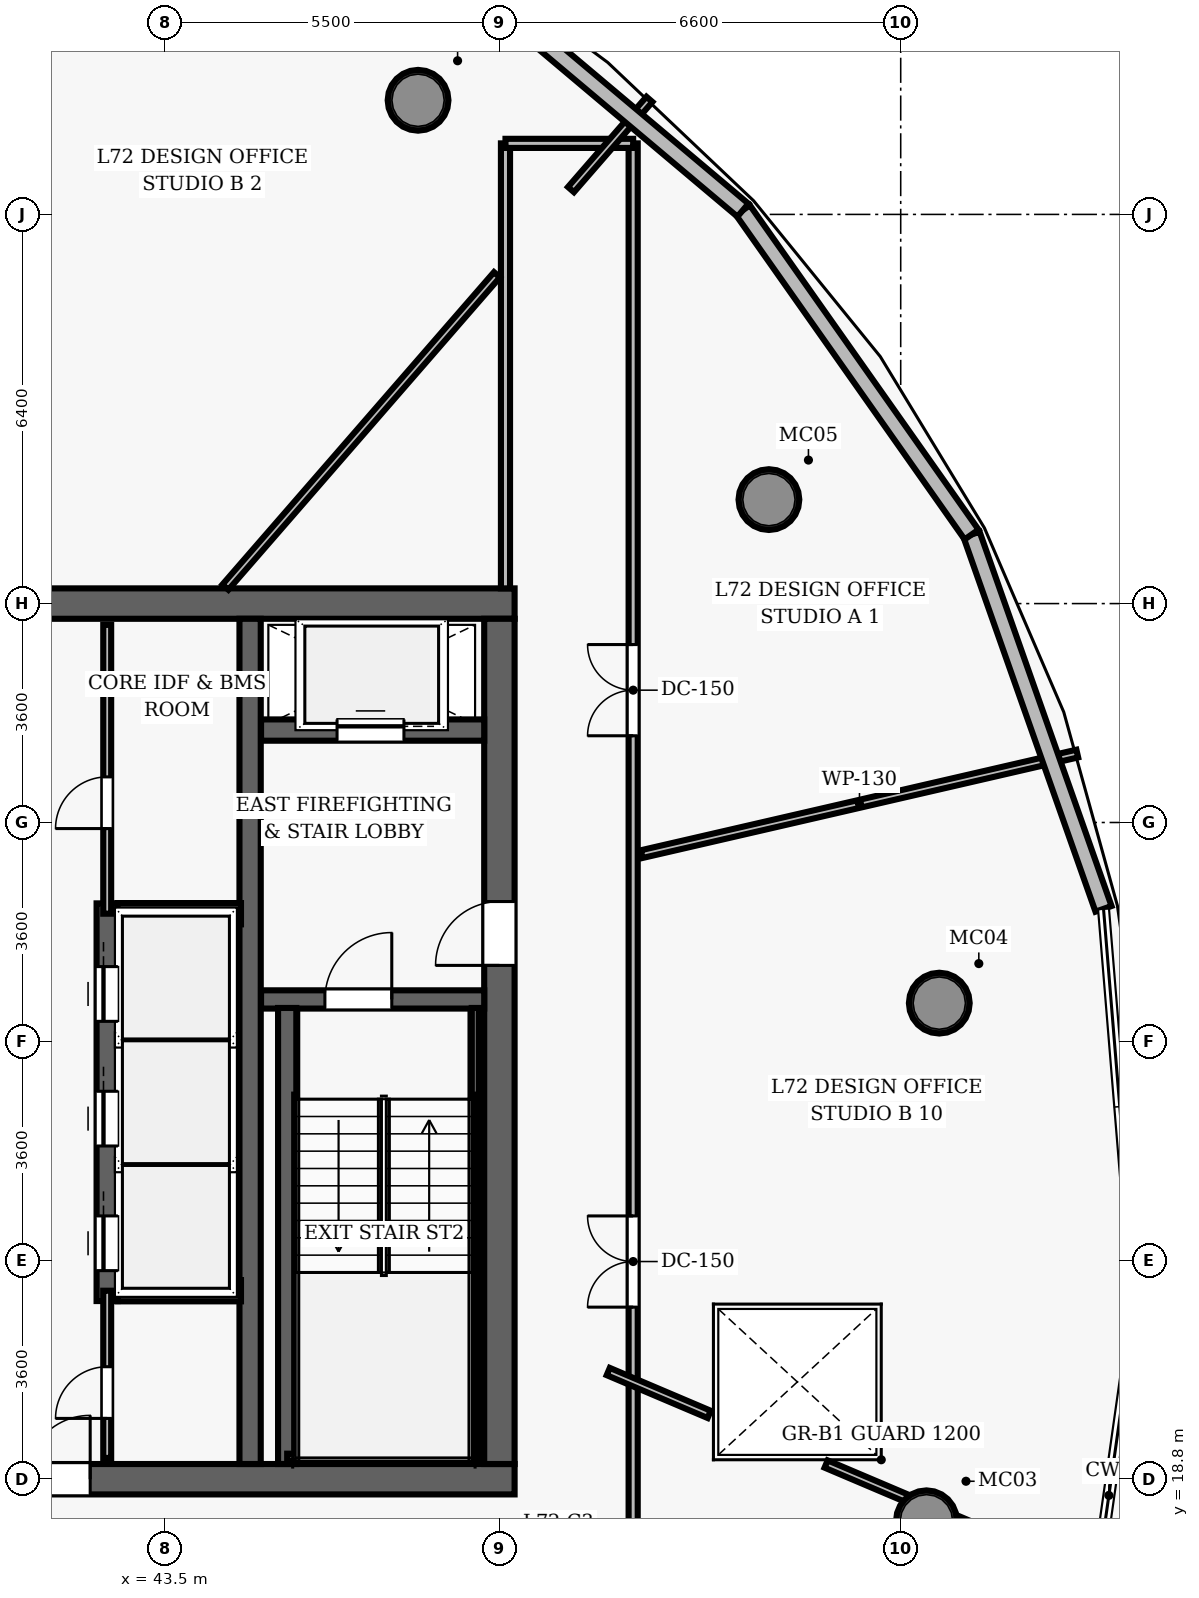
"""IFC4 building model, lengths in metres.
Left out: names, types, materials, properties, quantities, classifications, styles, units other than length and angle.
Written with IfcOpenShell. Run it as: python <this file> out.ifc"""

import sys

from ifc_helpers import new_model, si_unit, direction, frame, frame_2d, origin, origin_2d, place, context, subcontext, project, spatial, rectangle, hollow_circle, extrude, element, fill, save


model = new_model("IFC4")
c1 = context("Model", 3, precision=1e-05, world=origin(), true_north=direction((0.0, 1.0)))
c2 = subcontext(c1, "Body", "Model", "MODEL_VIEW")
j1 = project(units=[si_unit("LENGTHUNIT", "METRE"), si_unit("PLANEANGLEUNIT", "RADIAN")], contexts=[c1])
p1 = place(None, origin())
s1 = spatial("IfcSite", under=j1, at=p1, CompositionType="ELEMENT")
p2 = place(p1, origin())
s2 = spatial("IfcBuilding", under=s1, at=p2, CompositionType="ELEMENT")
p3 = place(p2, frame((0.0, 0.0, 284.4)))
s3 = spatial("IfcBuildingStorey", under=s2, at=p3, CompositionType="ELEMENT", Elevation=284.4)
p4 = place(p3, frame((26.75, 18.8, 0.0), z_axis=(0.0, 0.0, 1.0), x_axis=(1.0, 0.0, 0.0)))
e1 = element("IfcWall", 1, at=p4, inside=s3, PredefinedType="SHEAR", context=c2, shape_type="SweptSolid", body=[
    extrude(rectangle(XDim=22.5, YDim=0.5, at=frame_2d((11.25, 0.0))), origin(), (0.0, 0.0, 1.0), 3.85),
])
p5 = place(p4, frame((14.47, 0.0, 0.0)))
e2 = element("IfcOpeningElement", 2, at=p5, cuts=e1, PredefinedType="OPENING", context=c2, shape_type="SweptSolid", body=[
    extrude(rectangle(XDim=1.05, YDim=2.15, at=frame_2d((0.525, 1.075))), frame((0.0, 0.26, 0.0), z_axis=(0.0, -1.0, 0.0), x_axis=(1.0, 0.0, 0.0)), (0.0, 0.0, 1.0), 0.52),
])
p6 = place(p3, frame((26.75, 33.2, 0.0), z_axis=(0.0, 0.0, 1.0), x_axis=(1.0, 0.0, 0.0)))
e3 = element("IfcWall", 3, at=p6, inside=s3, PredefinedType="SHEAR", context=c2, shape_type="SweptSolid", body=[
    extrude(rectangle(XDim=22.5, YDim=0.5, at=frame_2d((11.25, 0.0))), origin(), (0.0, 0.0, 1.0), 3.85),
])
p7 = place(p3, frame((49.0, 19.05, 0.0), z_axis=(0.0, 0.0, 1.0), x_axis=(0.0, 1.0, 0.0)))
e4 = element("IfcWall", 4, at=p7, inside=s3, PredefinedType="SHEAR", context=c2, shape_type="SweptSolid", body=[
    extrude(rectangle(XDim=13.9, YDim=0.5, at=frame_2d((6.95, 0.0))), origin(), (0.0, 0.0, 1.0), 3.85),
])
p8 = place(p7, frame((8.2, 0.0, 0.0)))
e5 = element("IfcOpeningElement", 5, at=p8, cuts=e4, PredefinedType="OPENING", context=c2, shape_type="SweptSolid", body=[
    extrude(rectangle(XDim=1.05, YDim=2.15, at=frame_2d((0.525, 1.075))), frame((0.0, 0.26, 0.0), z_axis=(0.0, -1.0, 0.0), x_axis=(1.0, 0.0, 0.0)), (0.0, 0.0, 1.0), 0.52),
])
p9 = place(p3, frame((44.9, 19.05, 0.0), z_axis=(0.0, 0.0, 1.0), x_axis=(0.0, 1.0, 0.0)))
e6 = element("IfcWall", 6, at=p9, inside=s3, PredefinedType="SHEAR", context=c2, shape_type="SweptSolid", body=[
    extrude(rectangle(XDim=13.9, YDim=0.35, at=frame_2d((6.95, 0.0))), origin(), (0.0, 0.0, 1.0), 3.85),
])
for number, where, z_axis, x_axis in (
    (7, (56.024, 18.116, 0.0), (0.0, 0.0, 1.0), (1.0, 0.0, 0.0)),
    (8, (56.235, 26.629, 0.0), (0.0, 0.0, 1.0), (1.0, 0.0, 0.0)),
    (9, (53.433, 34.91, 0.0), (0.0, 0.0, 1.0), (1.0, 0.0, 0.0)),
    (10, (47.662, 41.477, 0.0), (0.0, 0.0, 1.0), (1.0, 0.0, 0.0)),
):
    element("IfcColumn", number, at=place(p3, frame(where, z_axis=z_axis, x_axis=x_axis)), inside=s3, PredefinedType="COLUMN", context=c2, shape_type="SweptSolid", body=[
        extrude(hollow_circle(Radius=0.5, WallThickness=0.045, at=origin_2d()), origin(), (0.0, 0.0, 1.0), 3.85),
    ])
p10 = place(p3, frame((45.08, 26.69, 0.0), z_axis=(0.0, 0.0, 1.0), x_axis=(1.0, 0.0, 0.0)))
e11 = element("IfcWall", 11, at=p10, inside=s3, PredefinedType="SHEAR", context=c2, shape_type="SweptSolid", body=[
    extrude(rectangle(XDim=3.67, YDim=0.3, at=frame_2d((1.835, 0.0))), origin(), (0.0, 0.0, 1.0), 3.85),
])
p11 = place(p10, frame((1.05, 0.0, 0.0)))
e12 = element("IfcOpeningElement", 12, at=p11, cuts=e11, PredefinedType="OPENING", context=c2, shape_type="SweptSolid", body=[
    extrude(rectangle(XDim=1.1, YDim=2.15, at=frame_2d((0.55, 1.075))), frame((0.0, 0.16, 0.0), z_axis=(0.0, -1.0, 0.0), x_axis=(1.0, 0.0, 0.0)), (0.0, 0.0, 1.0), 0.32),
])
p12 = place(p3, frame((45.51, 19.05, 0.0), z_axis=(0.0, 0.0, 1.0), x_axis=(0.0, 1.0, 0.0)))
e13 = element("IfcWall", 13, at=p12, inside=s3, PredefinedType="SHEAR", context=c2, shape_type="SweptSolid", body=[
    extrude(rectangle(XDim=7.5, YDim=0.3, at=frame_2d((3.75, 0.0))), origin(), (0.0, 0.0, 1.0), 3.85),
])
p13 = place(p3, frame((48.605, 19.1, 0.0), z_axis=(0.0, 0.0, 1.0), x_axis=(0.0, 1.0, 0.0)))
e14 = element("IfcWall", 14, at=p13, inside=s3, PredefinedType="SHEAR", context=c2, shape_type="SweptSolid", body=[
    extrude(rectangle(XDim=7.45, YDim=0.12, at=frame_2d((3.725, 0.0))), origin(), (0.0, 0.0, 1.0), 3.85),
])
p14 = place(p3, frame((45.51, 19.16, 0.0), z_axis=(0.0, 0.0, 1.0), x_axis=(1.0, 0.0, 0.0)))
e15 = element("IfcWall", 15, at=p14, inside=s3, PredefinedType="SHEAR", context=c2, shape_type="SweptSolid", body=[
    extrude(rectangle(XDim=3.095, YDim=0.12, at=frame_2d((1.547, 0.0))), origin(), (0.0, 0.0, 1.0), 3.85),
])
p15 = place(p3, frame((45.08, 31.12, 0.0), z_axis=(0.0, 0.0, 1.0), x_axis=(1.0, 0.0, 0.0)))
e16 = element("IfcWall", 16, at=p15, inside=s3, PredefinedType="SHEAR", context=c2, shape_type="SweptSolid", body=[
    extrude(rectangle(XDim=3.67, YDim=0.35, at=frame_2d((1.835, 0.0))), origin(), (0.0, 0.0, 1.0), 3.04),
])
p16 = place(p15, frame((1.25, 0.0, 0.0)))
e17 = element("IfcOpeningElement", 17, at=p16, cuts=e16, PredefinedType="OPENING", context=c2, shape_type="SweptSolid", body=[
    extrude(rectangle(XDim=1.1, YDim=2.15, at=frame_2d((0.55, 1.075))), frame((0.0, 0.185, 0.0), z_axis=(0.0, -1.0, 0.0), x_axis=(1.0, 0.0, 0.0)), (0.0, 0.0, 1.0), 0.37),
])
p17 = place(p3, frame((42.55, 21.73, 0.0), z_axis=(0.0, 0.0, 1.0), x_axis=(0.0, 1.0, 0.0)))
e18 = element("IfcWall", 18, at=p17, inside=s3, PredefinedType="SHEAR", context=c2, shape_type="SweptSolid", body=[
    extrude(rectangle(XDim=6.54, YDim=0.35, at=frame_2d((3.27, 0.0))), origin(), (0.0, 0.0, 1.0), 3.04),
])
p18 = place(p17, frame((0.5, 0.0, 0.0)))
e19 = element("IfcOpeningElement", 19, at=p18, cuts=e18, PredefinedType="OPENING", context=c2, shape_type="SweptSolid", body=[
    extrude(rectangle(XDim=0.9, YDim=2.15, at=frame_2d((0.45, 1.075))), frame((0.0, 0.185, 0.0), z_axis=(0.0, -1.0, 0.0), x_axis=(1.0, 0.0, 0.0)), (0.0, 0.0, 1.0), 0.37),
])
p19 = place(p17, frame((2.55, 0.0, 0.0)))
e20 = element("IfcOpeningElement", 20, at=p19, cuts=e18, PredefinedType="OPENING", context=c2, shape_type="SweptSolid", body=[
    extrude(rectangle(XDim=0.9, YDim=2.15, at=frame_2d((0.45, 1.075))), frame((0.0, 0.185, 0.0), z_axis=(0.0, -1.0, 0.0), x_axis=(1.0, 0.0, 0.0)), (0.0, 0.0, 1.0), 0.37),
])
p20 = place(p17, frame((4.6, 0.0, 0.0)))
e21 = element("IfcOpeningElement", 21, at=p20, cuts=e18, PredefinedType="OPENING", context=c2, shape_type="SweptSolid", body=[
    extrude(rectangle(XDim=0.9, YDim=2.15, at=frame_2d((0.45, 1.075))), frame((0.0, 0.185, 0.0), z_axis=(0.0, -1.0, 0.0), x_axis=(1.0, 0.0, 0.0)), (0.0, 0.0, 1.0), 0.37),
])
for number, where, z_axis, x_axis in (
    (22, (42.72, 21.9, 0.0), (0.0, 0.0, 1.0), (1.0, 0.0, 0.0)),
    (23, (42.72, 28.1, 0.0), (0.0, 0.0, 1.0), (1.0, 0.0, 0.0)),
):
    element("IfcWall", number, at=place(p3, frame(where, z_axis=z_axis, x_axis=x_axis)), inside=s3, PredefinedType="SHEAR", context=c2, shape_type="SweptSolid", body=[
        extrude(rectangle(XDim=2.03, YDim=0.35, at=frame_2d((1.015, 0.0))), origin(), (0.0, 0.0, 1.0), 3.04),
    ])
p21 = place(p3, frame((42.55, 28.1, 0.0), z_axis=(0.0, 0.0, 1.0), x_axis=(0.0, 1.0, 0.0)))
e24 = element("IfcWall", 24, at=p21, inside=s3, PredefinedType="PARTITIONING", context=c2, shape_type="SweptSolid", body=[
    extrude(rectangle(XDim=4.75, YDim=0.13, at=frame_2d((2.375, 0.0))), origin(), (0.0, 0.0, 1.0), 3.04),
])
p22 = place(p21, frame((1.4, 0.0, 0.0)))
e25 = element("IfcOpeningElement", 25, at=p22, cuts=e24, PredefinedType="OPENING", context=c2, shape_type="SweptSolid", body=[
    extrude(rectangle(XDim=0.85, YDim=2.1, at=frame_2d((0.425, 1.05))), frame((0.0, 0.075, 0.0), z_axis=(0.0, -1.0, 0.0), x_axis=(1.0, 0.0, 0.0)), (0.0, 0.0, 1.0), 0.15),
])
p23 = place(p3, frame((42.55, 19.15, 0.0), z_axis=(0.0, 0.0, 1.0), x_axis=(0.0, 1.0, 0.0)))
e26 = element("IfcWall", 26, at=p23, inside=s3, PredefinedType="PARTITIONING", context=c2, shape_type="SweptSolid", body=[
    extrude(rectangle(XDim=2.75, YDim=0.13, at=frame_2d((1.375, 0.0))), origin(), (0.0, 0.0, 1.0), 3.04),
])
p24 = place(p23, frame((0.65, 0.0, 0.0)))
e27 = element("IfcOpeningElement", 27, at=p24, cuts=e26, PredefinedType="OPENING", context=c2, shape_type="SweptSolid", body=[
    extrude(rectangle(XDim=0.85, YDim=2.1, at=frame_2d((0.425, 1.05))), frame((0.0, 0.075, 0.0), z_axis=(0.0, -1.0, 0.0), x_axis=(1.0, 0.0, 0.0)), (0.0, 0.0, 1.0), 0.15),
])
p25 = place(p3, frame((51.2, 10.6, 0.0), z_axis=(0.0, 0.0, 1.0), x_axis=(0.0, 1.0, 0.0)))
e28 = element("IfcWall", 28, at=p25, inside=s3, PredefinedType="PARTITIONING", context=c2, shape_type="SweptSolid", body=[
    extrude(rectangle(XDim=30.168, YDim=0.15, at=frame_2d((15.084, 0.0))), origin(), (0.0, 0.0, 1.0), 3.04),
])
p26 = place(p25, frame((20.426, 0.0, 0.0)))
e29 = element("IfcOpeningElement", 29, at=p26, cuts=e28, PredefinedType="OPENING", context=c2, shape_type="SweptSolid", body=[
    extrude(rectangle(XDim=1.5, YDim=2.2, at=frame_2d((0.75, 1.1))), frame((0.0, 0.085, 0.0), z_axis=(0.0, -1.0, 0.0), x_axis=(1.0, 0.0, 0.0)), (0.0, 0.0, 1.0), 0.17),
])
p27 = place(p25, frame((11.03, 0.0, 0.0)))
e30 = element("IfcOpeningElement", 30, at=p27, cuts=e28, PredefinedType="OPENING", context=c2, shape_type="SweptSolid", body=[
    extrude(rectangle(XDim=1.5, YDim=2.2, at=frame_2d((0.75, 1.1))), frame((0.0, 0.085, 0.0), z_axis=(0.0, -1.0, 0.0), x_axis=(1.0, 0.0, 0.0)), (0.0, 0.0, 1.0), 0.17),
])
p28 = place(p3, frame((49.1, 33.45, 0.0), z_axis=(0.0, 0.0, 1.0), x_axis=(0.0, 1.0, 0.0)))
e31 = element("IfcWall", 31, at=p28, inside=s3, PredefinedType="PARTITIONING", context=c2, shape_type="SweptSolid", body=[
    extrude(rectangle(XDim=7.318, YDim=0.15, at=frame_2d((3.659, 0.0))), origin(), (0.0, 0.0, 1.0), 3.04),
])
p29 = place(p3, frame((49.1, 40.768, 0.0), z_axis=(0.0, 0.0, 1.0), x_axis=(1.0, 0.0, 0.0)))
e32 = element("IfcWall", 32, at=p29, inside=s3, PredefinedType="PARTITIONING", context=c2, shape_type="SweptSolid", body=[
    extrude(rectangle(XDim=2.1, YDim=0.15, at=frame_2d((1.05, 0.0))), origin(), (0.0, 0.0, 1.0), 3.04),
])
p30 = place(p3, frame((51.34, 29.08, 0.0), z_axis=(0.0, 0.0, 1.0), x_axis=(0.974374403815, 0.224932259114, 0.0)))
e33 = element("IfcWall", 33, at=p30, inside=s3, PredefinedType="PARTITIONING", context=c2, shape_type="SweptSolid", body=[
    extrude(rectangle(XDim=7.353, YDim=0.13, at=frame_2d((3.676, 0.0))), origin(), (0.0, 0.0, 1.0), 3.04),
])
p31 = place(p3, frame((44.494, 33.47, 0.0), z_axis=(0.0, 0.0, 1.0), x_axis=(0.656056181598, 0.754712055414, 0.0)))
e34 = element("IfcWall", 34, at=p31, inside=s3, PredefinedType="PARTITIONING", context=c2, shape_type="SweptSolid", body=[
    extrude(rectangle(XDim=6.808, YDim=0.13, at=frame_2d((3.404, 0.0))), origin(), (0.0, 0.0, 1.0), 3.04),
])
p32 = place(p3, frame((50.177, 40.008, 0.0), z_axis=(0.0, 0.0, 1.0), x_axis=(0.65617256833, 0.754610866984, 0.0)))
e35 = element("IfcWall", 35, at=p32, inside=s3, PredefinedType="PARTITIONING", context=c2, shape_type="SweptSolid", body=[
    extrude(rectangle(XDim=1.967, YDim=0.13, at=frame_2d((0.983, 0.0))), origin(), (0.0, 0.0, 1.0), 3.04),
])
p33 = place(p3, frame((50.79, 20.571, 0.0), z_axis=(0.0, 0.0, 1.0), x_axis=(0.920456362026, -0.390845347429, 0.0)))
e36 = element("IfcWall", 36, at=p33, inside=s3, PredefinedType="PARTITIONING", context=c2, shape_type="SweptSolid", body=[
    extrude(rectangle(XDim=1.803, YDim=0.13, at=frame_2d((0.902, 0.0))), origin(), (0.0, 0.0, 1.0), 3.04),
])
p34 = place(p3, frame((54.373, 19.05, 0.0), z_axis=(0.0, 0.0, 1.0), x_axis=(0.920491611713, -0.390762322603, 0.0)))
e37 = element("IfcWall", 37, at=p34, inside=s3, PredefinedType="PARTITIONING", context=c2, shape_type="SweptSolid", body=[
    extrude(rectangle(XDim=5.193, YDim=0.13, at=frame_2d((2.597, 0.0))), origin(), (0.0, 0.0, 1.0), 3.04),
])
p35 = place(p3, frame((56.766, 34.335, 0.0), z_axis=(0.0, 0.0, 1.0), x_axis=(0.332463989461, -0.943115950301, 0.0)))
e38 = element("IfcWall", 38, at=p35, inside=s3, PredefinedType="SOLIDWALL", context=c2, shape_type="SweptSolid", body=[
    extrude(rectangle(XDim=6.527, YDim=0.28, at=frame_2d((3.263, 0.0))), origin(), (0.0, 0.0, 1.0), 3.625),
])
p36 = place(p3, frame((53.005, 39.67, 0.0), z_axis=(0.0, 0.0, 1.0), x_axis=(0.576177911519, -0.817324301779, 0.0)))
e39 = element("IfcWall", 39, at=p36, inside=s3, PredefinedType="SOLIDWALL", context=c2, shape_type="SweptSolid", body=[
    extrude(rectangle(XDim=6.527, YDim=0.28, at=frame_2d((3.264, 0.0))), origin(), (0.0, 0.0, 1.0), 3.625),
])
p37 = place(p3, frame((48.012, 43.873, 0.0), z_axis=(0.0, 0.0, 1.0), x_axis=(0.765007232119, -0.644021688148, 0.0)))
e40 = element("IfcWall", 40, at=p37, inside=s3, PredefinedType="SOLIDWALL", context=c2, shape_type="SweptSolid", body=[
    extrude(rectangle(XDim=6.526, YDim=0.28, at=frame_2d((3.263, 0.0))), origin(), (0.0, 0.0, 1.0), 3.625),
])
p38 = place(p11, origin())
e41 = element("IfcDoor", 41, at=p38, inside=s3, OperationType="SINGLE_SWING_RIGHT", PredefinedType="DOOR", context=c2, shape_type="SweptSolid", body=[
    extrude(rectangle(XDim=1.1, YDim=2.15, at=frame_2d((0.55, 1.075))), frame((0.0, 0.025, 0.0), z_axis=(0.0, -1.0, 0.0), x_axis=(1.0, 0.0, 0.0)), (0.0, 0.0, 1.0), 0.05),
])
fill(e12, e41)
p39 = place(p8, origin())
e42 = element("IfcDoor", 42, at=p39, inside=s3, OperationType="SINGLE_SWING_LEFT", PredefinedType="DOOR", context=c2, shape_type="SweptSolid", body=[
    extrude(rectangle(XDim=1.05, YDim=2.15, at=frame_2d((0.525, 1.075))), frame((0.0, 0.025, 0.0), z_axis=(0.0, -1.0, 0.0), x_axis=(1.0, 0.0, 0.0)), (0.0, 0.0, 1.0), 0.05),
])
fill(e5, e42)
p40 = place(p5, origin())
e43 = element("IfcDoor", 43, at=p40, inside=s3, OperationType="SINGLE_SWING_RIGHT", PredefinedType="DOOR", context=c2, shape_type="SweptSolid", body=[
    extrude(rectangle(XDim=1.05, YDim=2.15, at=frame_2d((0.525, 1.075))), frame((0.0, 0.025, 0.0), z_axis=(0.0, -1.0, 0.0), x_axis=(1.0, 0.0, 0.0)), (0.0, 0.0, 1.0), 0.05),
])
fill(e2, e43)
p41 = place(p22, origin())
e44 = element("IfcDoor", 44, at=p41, inside=s3, OperationType="SINGLE_SWING_LEFT", PredefinedType="DOOR", context=c2, shape_type="SweptSolid", body=[
    extrude(rectangle(XDim=0.85, YDim=2.1, at=frame_2d((0.425, 1.05))), frame((0.0, 0.025, 0.0), z_axis=(0.0, -1.0, 0.0), x_axis=(1.0, 0.0, 0.0)), (0.0, 0.0, 1.0), 0.05),
])
fill(e25, e44)
p42 = place(p24, origin())
e45 = element("IfcDoor", 45, at=p42, inside=s3, OperationType="SINGLE_SWING_LEFT", PredefinedType="DOOR", context=c2, shape_type="SweptSolid", body=[
    extrude(rectangle(XDim=0.85, YDim=2.1, at=frame_2d((0.425, 1.05))), frame((0.0, 0.025, 0.0), z_axis=(0.0, -1.0, 0.0), x_axis=(1.0, 0.0, 0.0)), (0.0, 0.0, 1.0), 0.05),
])
fill(e27, e45)
p43 = place(p26, origin())
e46 = element("IfcDoor", 46, at=p43, inside=s3, OperationType="DOUBLE_DOOR_SINGLE_SWING", PredefinedType="DOOR", context=c2, shape_type="SweptSolid", body=[
    extrude(rectangle(XDim=1.5, YDim=2.2, at=frame_2d((0.75, 1.1))), frame((0.0, 0.025, 0.0), z_axis=(0.0, -1.0, 0.0), x_axis=(1.0, 0.0, 0.0)), (0.0, 0.0, 1.0), 0.05),
])
fill(e29, e46)
p44 = place(p27, origin())
e47 = element("IfcDoor", 47, at=p44, inside=s3, OperationType="DOUBLE_DOOR_SINGLE_SWING", PredefinedType="DOOR", context=c2, shape_type="SweptSolid", body=[
    extrude(rectangle(XDim=1.5, YDim=2.2, at=frame_2d((0.75, 1.1))), frame((0.0, 0.025, 0.0), z_axis=(0.0, -1.0, 0.0), x_axis=(1.0, 0.0, 0.0)), (0.0, 0.0, 1.0), 0.05),
])
fill(e30, e47)
p45 = place(p18, origin())
e48 = element("IfcDoor", 48, at=p45, inside=s3, OperationType="SLIDING_TO_LEFT", PredefinedType="DOOR", context=c2, shape_type="SweptSolid", body=[
    extrude(rectangle(XDim=0.9, YDim=2.15, at=frame_2d((0.45, 1.075))), frame((0.0, 0.025, 0.0), z_axis=(0.0, -1.0, 0.0), x_axis=(1.0, 0.0, 0.0)), (0.0, 0.0, 1.0), 0.05),
])
fill(e19, e48)
p46 = place(p19, origin())
e49 = element("IfcDoor", 49, at=p46, inside=s3, OperationType="SLIDING_TO_LEFT", PredefinedType="DOOR", context=c2, shape_type="SweptSolid", body=[
    extrude(rectangle(XDim=0.9, YDim=2.15, at=frame_2d((0.45, 1.075))), frame((0.0, 0.025, 0.0), z_axis=(0.0, -1.0, 0.0), x_axis=(1.0, 0.0, 0.0)), (0.0, 0.0, 1.0), 0.05),
])
fill(e20, e49)
p47 = place(p20, origin())
e50 = element("IfcDoor", 50, at=p47, inside=s3, OperationType="SLIDING_TO_LEFT", PredefinedType="DOOR", context=c2, shape_type="SweptSolid", body=[
    extrude(rectangle(XDim=0.9, YDim=2.15, at=frame_2d((0.45, 1.075))), frame((0.0, 0.025, 0.0), z_axis=(0.0, -1.0, 0.0), x_axis=(1.0, 0.0, 0.0)), (0.0, 0.0, 1.0), 0.05),
])
fill(e21, e50)
p48 = place(p16, origin())
e51 = element("IfcDoor", 51, at=p48, inside=s3, OperationType="SLIDING_TO_LEFT", PredefinedType="DOOR", context=c2, shape_type="SweptSolid", body=[
    extrude(rectangle(XDim=1.1, YDim=2.15, at=frame_2d((0.55, 1.075))), frame((0.0, 0.025, 0.0), z_axis=(0.0, -1.0, 0.0), x_axis=(1.0, 0.0, 0.0)), (0.0, 0.0, 1.0), 0.05),
])
fill(e17, e51)
save(model, sys.argv[1])
